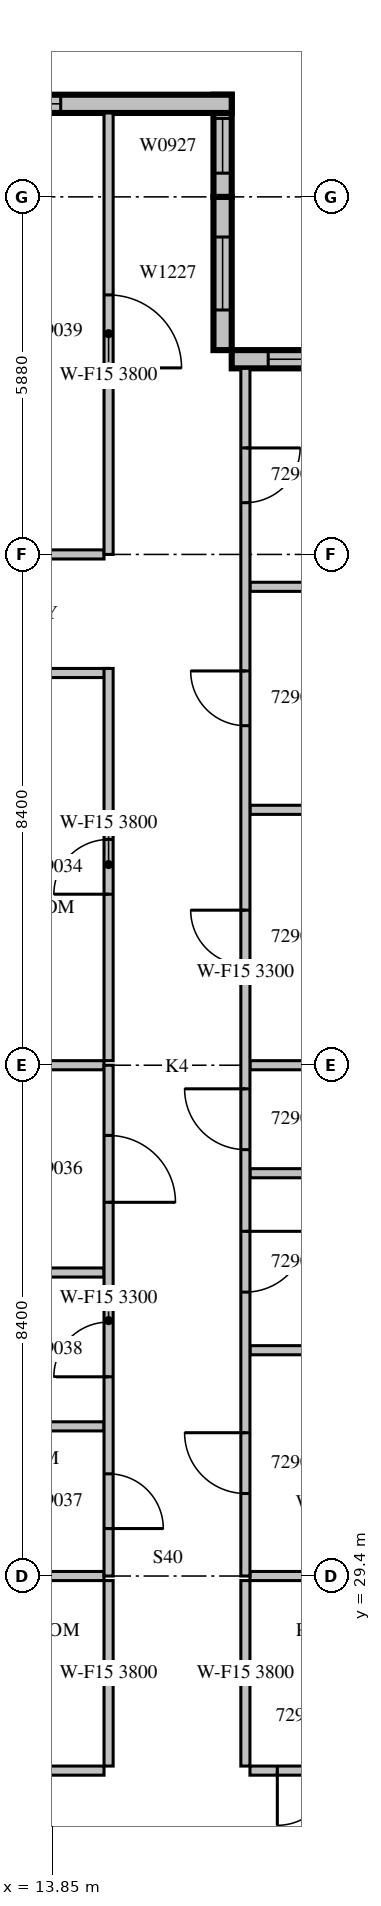
"""IFC4 building model, lengths in metres.
Left out: names, types, materials, properties, quantities, classifications, styles, units other than length and angle.
Written with IfcOpenShell. Run it as: python <this file> out.ifc"""

import sys

from ifc_helpers import new_model, si_unit, direction, frame, frame_2d, origin, place, context, subcontext, project, spatial, rectangle, extrude, source, transform, mapped, element, fill, save


model = new_model("IFC4")
c1 = context("Model", 3, precision=1e-05, world=origin(), true_north=direction((0.0, 1.0)))
c2 = subcontext(c1, "Body", "Model", "MODEL_VIEW")
j1 = project(units=[si_unit("LENGTHUNIT", "METRE"), si_unit("PLANEANGLEUNIT", "RADIAN")], contexts=[c1])
p1 = place(None, origin())
s1 = spatial("IfcSite", under=j1, at=p1, CompositionType="ELEMENT")
p2 = place(p1, origin())
s2 = spatial("IfcBuilding", under=s1, at=p2, CompositionType="ELEMENT")
p3 = place(p2, frame((0.0, 0.0, 132.9)))
s3 = spatial("IfcBuildingStorey", under=s2, at=p3, CompositionType="ELEMENT", Elevation=132.9)
m1 = source(origin(), c2, "Body", "SweptSolid", [
    extrude(rectangle(XDim=4.2, YDim=0.3, at=frame_2d((2.1, 0.0))), origin(), (0.0, 0.0, 1.0), 3.8),
])
p4 = place(p3, frame((21.0, 49.41, 0.0), z_axis=(0.0, 0.0, 1.0), x_axis=(-1.0, 0.0, 0.0)))
e1 = element("IfcWall", 1, at=p4, inside=s3, PredefinedType="STANDARD", context=c2, shape_type="MappedRepresentation", body=[
    mapped(m1, transform((0.0, 0.0, 0.0), scale=1.0)),
])
m2 = source(origin(), c2, "Body", "SweptSolid", [
    extrude(rectangle(XDim=3.0, YDim=2.7, at=frame_2d((1.5, 1.35))), frame((0.0, 0.16, 0.0), z_axis=(0.0, -1.0, 0.0), x_axis=(1.0, 0.0, 0.0)), (0.0, 0.0, 1.0), 0.32),
])
p5 = place(p4, frame((0.6, 0.0, 0.6)))
e2 = element("IfcOpeningElement", 2, at=p5, cuts=e1, PredefinedType="OPENING", context=c2, shape_type="MappedRepresentation", body=[
    mapped(m2, transform((0.0, 0.0, 0.0), scale=1.0)),
])
m3 = source(origin(), c2, "Body", "SweptSolid", [
    extrude(rectangle(XDim=2.52, YDim=0.3, at=frame_2d((1.26, 0.0))), origin(), (0.0, 0.0, 1.0), 3.8),
])
p6 = place(p3, frame((16.65, 49.56, 0.0), z_axis=(0.0, 0.0, 1.0), x_axis=(0.0, 1.0, 0.0)))
e3 = element("IfcWall", 3, at=p6, inside=s3, PredefinedType="STANDARD", context=c2, shape_type="MappedRepresentation", body=[
    mapped(m3, transform((0.0, 0.0, 0.0), scale=1.0)),
])
m4 = source(origin(), c2, "Body", "SweptSolid", [
    extrude(rectangle(XDim=1.2, YDim=2.7, at=frame_2d((0.6, 1.35))), frame((0.0, 0.16, 0.0), z_axis=(0.0, -1.0, 0.0), x_axis=(1.0, 0.0, 0.0)), (0.0, 0.0, 1.0), 0.32),
])
p7 = place(p6, frame((0.66, 0.0, 0.6)))
e4 = element("IfcOpeningElement", 4, at=p7, cuts=e3, PredefinedType="OPENING", context=c2, shape_type="MappedRepresentation", body=[
    mapped(m4, transform((0.0, 0.0, 0.0), scale=1.0)),
])
m5 = source(origin(), c2, "Body", "SweptSolid", [
    extrude(rectangle(XDim=1.68, YDim=0.3, at=frame_2d((0.84, 0.0))), origin(), (0.0, 0.0, 1.0), 3.8),
])
p8 = place(p3, frame((16.65, 52.08, 0.0), z_axis=(0.0, 0.0, 1.0), x_axis=(0.0, 1.0, 0.0)))
e5 = element("IfcWall", 5, at=p8, inside=s3, PredefinedType="STANDARD", context=c2, shape_type="MappedRepresentation", body=[
    mapped(m5, transform((0.0, 0.0, 0.0), scale=1.0)),
])
m6 = source(origin(), c2, "Body", "SweptSolid", [
    extrude(rectangle(XDim=0.9, YDim=2.7, at=frame_2d((0.45, 1.35))), frame((0.0, 0.16, 0.0), z_axis=(0.0, -1.0, 0.0), x_axis=(1.0, 0.0, 0.0)), (0.0, 0.0, 1.0), 0.32),
])
p9 = place(p8, frame((0.39, 0.0, 0.6)))
e6 = element("IfcOpeningElement", 6, at=p9, cuts=e5, PredefinedType="OPENING", context=c2, shape_type="MappedRepresentation", body=[
    mapped(m6, transform((0.0, 0.0, 0.0), scale=1.0)),
])
m7 = source(origin(), c2, "Body", "SweptSolid", [
    extrude(rectangle(XDim=10.5, YDim=0.3, at=frame_2d((5.25, 0.0))), origin(), (0.0, 0.0, 1.0), 3.8),
])
p10 = place(p3, frame((16.8, 53.61, 0.0), z_axis=(0.0, 0.0, 1.0), x_axis=(-1.0, 0.0, 0.0)))
e7 = element("IfcWall", 7, at=p10, inside=s3, PredefinedType="STANDARD", context=c2, shape_type="MappedRepresentation", body=[
    mapped(m7, transform((0.0, 0.0, 0.0), scale=1.0)),
])
m8 = source(origin(), c2, "Body", "SweptSolid", [
    extrude(rectangle(XDim=1.8, YDim=2.7, at=frame_2d((0.9, 1.35))), frame((0.0, 0.16, 0.0), z_axis=(0.0, -1.0, 0.0), x_axis=(1.0, 0.0, 0.0)), (0.0, 0.0, 1.0), 0.32),
])
p11 = place(p10, frame((8.025, 0.0, 0.6)))
e8 = element("IfcOpeningElement", 8, at=p11, cuts=e7, PredefinedType="OPENING", context=c2, shape_type="MappedRepresentation", body=[
    mapped(m8, transform((0.0, 0.0, 0.0), scale=1.0)),
])
m9 = source(origin(), c2, "Body", "SweptSolid", [
    extrude(rectangle(XDim=2.4, YDim=2.7, at=frame_2d((1.2, 1.35))), frame((0.0, 0.16, 0.0), z_axis=(0.0, -1.0, 0.0), x_axis=(1.0, 0.0, 0.0)), (0.0, 0.0, 1.0), 0.32),
])
p12 = place(p10, frame((2.812, 0.0, 0.6)))
e9 = element("IfcOpeningElement", 9, at=p12, cuts=e7, PredefinedType="OPENING", context=c2, shape_type="MappedRepresentation", body=[
    mapped(m9, transform((0.0, 0.0, 0.0), scale=1.0)),
])
m10 = source(origin(), c2, "Body", "SweptSolid", [
    extrude(rectangle(XDim=3.995, YDim=0.15, at=frame_2d((1.998, 0.0))), origin(), (0.0, 0.0, 1.0), 3.8),
])
p13 = place(p3, frame((10.705, 26.2, 0.0), z_axis=(0.0, 0.0, 1.0), x_axis=(1.0, 0.0, 0.0)))
e10 = element("IfcWall", 10, at=p13, inside=s3, PredefinedType="PARTITIONING", context=c2, shape_type="MappedRepresentation", body=[
    mapped(m10, transform((0.0, 0.0, 0.0), scale=1.0)),
])
m11 = source(origin(), c2, "Body", "SweptSolid", [
    extrude(rectangle(XDim=0.9, YDim=2.1, at=frame_2d((0.45, 1.05))), frame((0.0, 0.085, 0.0), z_axis=(0.0, -1.0, 0.0), x_axis=(1.0, 0.0, 0.0)), (0.0, 0.0, 1.0), 0.17),
])
p14 = place(p13, frame((2.132, 0.0, 0.0)))
e11 = element("IfcOpeningElement", 11, at=p14, cuts=e10, PredefinedType="OPENING", context=c2, shape_type="MappedRepresentation", body=[
    mapped(m11, transform((0.0, 0.0, 0.0), scale=1.0)),
])
m12 = source(origin(), c2, "Body", "SweptSolid", [
    extrude(rectangle(XDim=3.6, YDim=0.15, at=frame_2d((1.8, 0.0))), origin(), (0.0, 0.0, 1.0), 3.8),
])
p15 = place(p3, frame((17.1, 26.2, 0.0), z_axis=(0.0, 0.0, 1.0), x_axis=(1.0, 0.0, 0.0)))
e12 = element("IfcWall", 12, at=p15, inside=s3, PredefinedType="PARTITIONING", context=c2, shape_type="MappedRepresentation", body=[
    mapped(m12, transform((0.0, 0.0, 0.0), scale=1.0)),
])
p16 = place(p15, frame((0.45, 0.0, 0.0)))
e13 = element("IfcOpeningElement", 13, at=p16, cuts=e12, PredefinedType="OPENING", context=c2, shape_type="MappedRepresentation", body=[
    mapped(m11, transform((0.0, 0.0, 0.0), scale=1.0)),
])
m13 = source(origin(), c2, "Body", "SweptSolid", [
    extrude(rectangle(XDim=3.05, YDim=0.15, at=frame_2d((1.525, 0.0))), origin(), (0.0, 0.0, 1.0), 3.8),
])
for number, where, z_axis, x_axis in (
    (14, (14.775, 26.275, 0.0), (0.0, 0.0, 1.0), (0.0, 1.0, 0.0)),
    (15, (17.025, 29.325, 0.0), (0.0, 0.0, 1.0), (0.0, -1.0, 0.0)),
):
    element("IfcWall", number, at=place(p3, frame(where, z_axis=z_axis, x_axis=x_axis)), inside=s3, PredefinedType="PARTITIONING", context=c2, shape_type="MappedRepresentation", body=[
        mapped(m13, transform((0.0, 0.0, 0.0), scale=1.0)),
    ])
m14 = source(origin(), c2, "Body", "SweptSolid", [
    extrude(rectangle(XDim=3.676, YDim=0.15, at=frame_2d((1.838, 0.0))), origin(), (0.0, 0.0, 1.0), 3.8),
])
p17 = place(p3, frame((14.7, 29.4, 0.0), z_axis=(0.0, 0.0, 1.0), x_axis=(-1.0, 0.0, 0.0)))
e16 = element("IfcWall", 16, at=p17, inside=s3, PredefinedType="PARTITIONING", context=c2, shape_type="MappedRepresentation", body=[
    mapped(m14, transform((0.0, 0.0, 0.0), scale=1.0)),
])
m15 = source(origin(), c2, "Body", "SweptSolid", [
    extrude(rectangle(XDim=2.851, YDim=0.15, at=frame_2d((1.425, 0.0))), origin(), (0.0, 0.0, 1.0), 3.8),
])
p18 = place(p3, frame((19.951, 29.4, 0.0), z_axis=(0.0, 0.0, 1.0), x_axis=(-1.0, 0.0, 0.0)))
e17 = element("IfcWall", 17, at=p18, inside=s3, PredefinedType="PARTITIONING", context=c2, shape_type="MappedRepresentation", body=[
    mapped(m15, transform((0.0, 0.0, 0.0), scale=1.0)),
])
m16 = source(origin(), c2, "Body", "SweptSolid", [
    extrude(rectangle(XDim=3.675, YDim=0.15, at=frame_2d((1.837, 0.0))), origin(), (0.0, 0.0, 1.0), 3.8),
])
p19 = place(p3, frame((14.775, 44.25, 0.0), z_axis=(0.0, 0.0, 1.0), x_axis=(-1.0, 0.0, 0.0)))
e18 = element("IfcWall", 18, at=p19, inside=s3, PredefinedType="PARTITIONING", context=c2, shape_type="MappedRepresentation", body=[
    mapped(m16, transform((0.0, 0.0, 0.0), scale=1.0)),
])
m17 = source(origin(), c2, "Body", "SweptSolid", [
    extrude(rectangle(XDim=6.45, YDim=0.15, at=frame_2d((3.225, 0.0))), origin(), (0.0, 0.0, 1.0), 3.8),
])
p20 = place(p3, frame((14.775, 37.875, 0.0), z_axis=(0.0, 0.0, 1.0), x_axis=(0.0, 1.0, 0.0)))
e19 = element("IfcWall", 19, at=p20, inside=s3, PredefinedType="PARTITIONING", context=c2, shape_type="MappedRepresentation", body=[
    mapped(m17, transform((0.0, 0.0, 0.0), scale=1.0)),
])
p21 = place(p20, frame((2.737, 0.0, 0.0)))
e20 = element("IfcOpeningElement", 20, at=p21, cuts=e19, PredefinedType="OPENING", context=c2, shape_type="MappedRepresentation", body=[
    mapped(m11, transform((0.0, 0.0, 0.0), scale=1.0)),
])
p22 = place(p3, frame((14.7, 31.861, 0.0), z_axis=(0.0, 0.0, 1.0), x_axis=(-1.0, 0.0, 0.0)))
e21 = element("IfcWall", 21, at=p22, inside=s3, PredefinedType="PARTITIONING", context=c2, shape_type="MappedRepresentation", body=[
    mapped(m10, transform((0.0, 0.0, 0.0), scale=1.0)),
])
p23 = place(p3, frame((14.7, 34.391, 0.0), z_axis=(0.0, 0.0, 1.0), x_axis=(-1.0, 0.0, 0.0)))
e22 = element("IfcWall", 22, at=p23, inside=s3, PredefinedType="PARTITIONING", context=c2, shape_type="SweptSolid", body=[
    extrude(rectangle(XDim=3.995, YDim=0.15, at=frame_2d((1.998, 0.0))), origin(), (0.0, 0.0, 1.0), 3.3),
])
p24 = place(p3, frame((14.7, 37.8, 0.0), z_axis=(0.0, 0.0, 1.0), x_axis=(-1.0, 0.0, 0.0)))
e23 = element("IfcWall", 23, at=p24, inside=s3, PredefinedType="PARTITIONING", context=c2, shape_type="MappedRepresentation", body=[
    mapped(m14, transform((0.0, 0.0, 0.0), scale=1.0)),
])
m18 = source(origin(), c2, "Body", "SweptSolid", [
    extrude(rectangle(XDim=3.525, YDim=0.15, at=frame_2d((1.762, 0.0))), origin(), (0.0, 0.0, 1.0), 3.8),
])
p25 = place(p3, frame((14.7, 46.2, 0.0), z_axis=(0.0, 0.0, 1.0), x_axis=(-1.0, 0.0, 0.0)))
e24 = element("IfcWall", 24, at=p25, inside=s3, PredefinedType="PARTITIONING", context=c2, shape_type="MappedRepresentation", body=[
    mapped(m18, transform((0.0, 0.0, 0.0), scale=1.0)),
])
m19 = source(origin(), c2, "Body", "SweptSolid", [
    extrude(rectangle(XDim=3.6, YDim=0.15, at=frame_2d((1.8, 0.0))), origin(), (0.0, 0.0, 1.0), 2.8),
])
for number, where, z_axis, x_axis in (
    (25, (17.1, 33.113, 0.0), (0.0, 0.0, 1.0), (1.0, 0.0, 0.0)),
    (26, (17.1, 36.024, 0.0), (0.0, 0.0, 1.0), (1.0, 0.0, 0.0)),
):
    element("IfcWall", number, at=place(p3, frame(where, z_axis=z_axis, x_axis=x_axis)), inside=s3, PredefinedType="PARTITIONING", context=c2, shape_type="MappedRepresentation", body=[
        mapped(m19, transform((0.0, 0.0, 0.0), scale=1.0)),
    ])
p26 = place(p3, frame((17.1, 45.667, 0.0), z_axis=(0.0, 0.0, 1.0), x_axis=(1.0, 0.0, 0.0)))
e27 = element("IfcWall", 27, at=p26, inside=s3, PredefinedType="PARTITIONING", context=c2, shape_type="MappedRepresentation", body=[
    mapped(m12, transform((0.0, 0.0, 0.0), scale=1.0)),
])
p27 = place(p3, frame((19.951, 37.8, 0.0), z_axis=(0.0, 0.0, 1.0), x_axis=(-1.0, 0.0, 0.0)))
e28 = element("IfcWall", 28, at=p27, inside=s3, PredefinedType="PARTITIONING", context=c2, shape_type="MappedRepresentation", body=[
    mapped(m15, transform((0.0, 0.0, 0.0), scale=1.0)),
])
p28 = place(p3, frame((20.7, 42.0, 0.0), z_axis=(0.0, 0.0, 1.0), x_axis=(-1.0, 0.0, 0.0)))
e29 = element("IfcWall", 29, at=p28, inside=s3, PredefinedType="PARTITIONING", context=c2, shape_type="MappedRepresentation", body=[
    mapped(m12, transform((0.0, 0.0, 0.0), scale=1.0)),
])
m20 = source(origin(), c2, "Body", "SweptSolid", [
    extrude(rectangle(XDim=8.4, YDim=0.15, at=frame_2d((4.2, 0.0))), origin(), (0.0, 0.0, 1.0), 3.3),
])
p29 = place(p3, frame((14.775, 29.4, 0.0), z_axis=(0.0, 0.0, 1.0), x_axis=(0.0, 1.0, 0.0)))
e30 = element("IfcWall", 30, at=p29, inside=s3, PredefinedType="PARTITIONING", context=c2, shape_type="MappedRepresentation", body=[
    mapped(m20, transform((0.0, 0.0, 0.0), scale=1.0)),
])
m21 = source(origin(), c2, "Body", "SweptSolid", [
    extrude(rectangle(XDim=1.1, YDim=2.1, at=frame_2d((0.55, 1.05))), frame((0.0, 0.085, 0.0), z_axis=(0.0, -1.0, 0.0), x_axis=(1.0, 0.0, 0.0)), (0.0, 0.0, 1.0), 0.17),
])
p30 = place(p29, frame((6.146, 0.0, 0.0)))
e31 = element("IfcOpeningElement", 31, at=p30, cuts=e30, PredefinedType="OPENING", context=c2, shape_type="MappedRepresentation", body=[
    mapped(m21, transform((0.0, 0.0, 0.0), scale=1.0)),
])
p31 = place(p29, frame((0.781, 0.0, 0.0)))
e32 = element("IfcOpeningElement", 32, at=p31, cuts=e30, PredefinedType="OPENING", context=c2, shape_type="MappedRepresentation", body=[
    mapped(m11, transform((0.0, 0.0, 0.0), scale=1.0)),
])
p32 = place(p29, frame((3.276, 0.0, 0.0)))
e33 = element("IfcOpeningElement", 33, at=p32, cuts=e30, PredefinedType="OPENING", context=c2, shape_type="MappedRepresentation", body=[
    mapped(m11, transform((0.0, 0.0, 0.0), scale=1.0)),
])
m22 = source(origin(), c2, "Body", "SweptSolid", [
    extrude(rectangle(XDim=7.26, YDim=0.15, at=frame_2d((3.63, 0.0))), origin(), (0.0, 0.0, 1.0), 3.8),
])
p33 = place(p3, frame((14.775, 46.2, 0.0), z_axis=(0.0, 0.0, 1.0), x_axis=(0.0, 1.0, 0.0)))
e34 = element("IfcWall", 34, at=p33, inside=s3, PredefinedType="PARTITIONING", context=c2, shape_type="MappedRepresentation", body=[
    mapped(m22, transform((0.0, 0.0, 0.0), scale=1.0)),
])
m23 = source(origin(), c2, "Body", "SweptSolid", [
    extrude(rectangle(XDim=1.2, YDim=2.1, at=frame_2d((0.6, 1.05))), frame((0.0, 0.085, 0.0), z_axis=(0.0, -1.0, 0.0), x_axis=(1.0, 0.0, 0.0)), (0.0, 0.0, 1.0), 0.17),
])
p34 = place(p33, frame((3.067, 0.0, 0.0)))
e35 = element("IfcOpeningElement", 35, at=p34, cuts=e34, PredefinedType="OPENING", context=c2, shape_type="MappedRepresentation", body=[
    mapped(m23, transform((0.0, 0.0, 0.0), scale=1.0)),
])
m24 = source(origin(), c2, "Body", "SweptSolid", [
    extrude(rectangle(XDim=19.86, YDim=0.15, at=frame_2d((9.93, 0.0))), origin(), (0.0, 0.0, 1.0), 3.3),
])
p35 = place(p3, frame((17.025, 49.26, 0.0), z_axis=(0.0, 0.0, 1.0), x_axis=(0.0, -1.0, 0.0)))
e36 = element("IfcWall", 36, at=p35, inside=s3, PredefinedType="PARTITIONING", context=c2, shape_type="MappedRepresentation", body=[
    mapped(m24, transform((0.0, 0.0, 0.0), scale=1.0)),
])
m25 = source(origin(), c2, "Body", "SweptSolid", [
    extrude(rectangle(XDim=1.0, YDim=2.1, at=frame_2d((0.5, 1.05))), frame((0.0, 0.085, 0.0), z_axis=(0.0, -1.0, 0.0), x_axis=(1.0, 0.0, 0.0)), (0.0, 0.0, 1.0), 0.17),
])
p36 = place(p35, frame((17.503, 0.0, 0.0)))
e37 = element("IfcOpeningElement", 37, at=p36, cuts=e36, PredefinedType="OPENING", context=c2, shape_type="MappedRepresentation", body=[
    mapped(m25, transform((0.0, 0.0, 0.0), scale=1.0)),
])
p37 = place(p35, frame((14.191, 0.0, 0.0)))
e38 = element("IfcOpeningElement", 38, at=p37, cuts=e36, PredefinedType="OPENING", context=c2, shape_type="MappedRepresentation", body=[
    mapped(m25, transform((0.0, 0.0, 0.0), scale=1.0)),
])
p38 = place(p35, frame((11.848, 0.0, 0.0)))
e39 = element("IfcOpeningElement", 39, at=p38, cuts=e36, PredefinedType="OPENING", context=c2, shape_type="MappedRepresentation", body=[
    mapped(m25, transform((0.0, 0.0, 0.0), scale=1.0)),
])
p39 = place(p35, frame((8.91, 0.0, 0.0)))
e40 = element("IfcOpeningElement", 40, at=p39, cuts=e36, PredefinedType="OPENING", context=c2, shape_type="MappedRepresentation", body=[
    mapped(m11, transform((0.0, 0.0, 0.0), scale=1.0)),
])
p40 = place(p35, frame((4.976, 0.0, 0.0)))
e41 = element("IfcOpeningElement", 41, at=p40, cuts=e36, PredefinedType="OPENING", context=c2, shape_type="MappedRepresentation", body=[
    mapped(m11, transform((0.0, 0.0, 0.0), scale=1.0)),
])
p41 = place(p35, frame((1.309, 0.0, 0.0)))
e42 = element("IfcOpeningElement", 42, at=p41, cuts=e36, PredefinedType="OPENING", context=c2, shape_type="MappedRepresentation", body=[
    mapped(m11, transform((0.0, 0.0, 0.0), scale=1.0)),
])
m26 = source(origin(), c2, "Body", "SweptSolid", [
    extrude(rectangle(XDim=3.0, YDim=2.7, at=frame_2d((1.5, 1.35))), frame((0.0, 0.03, 0.0), z_axis=(0.0, -1.0, 0.0), x_axis=(1.0, 0.0, 0.0)), (0.0, 0.0, 1.0), 0.06),
])
p42 = place(p5, origin())
e43 = element("IfcWindow", 43, at=p42, inside=s3, PartitioningType="SINGLE_PANEL", PredefinedType="WINDOW", context=c2, shape_type="MappedRepresentation", body=[
    mapped(m26, transform((0.0, 0.0, 0.0), scale=1.0)),
])
fill(e2, e43)
m27 = source(origin(), c2, "Body", "SweptSolid", [
    extrude(rectangle(XDim=1.2, YDim=2.7, at=frame_2d((0.6, 1.35))), frame((0.0, 0.03, 0.0), z_axis=(0.0, -1.0, 0.0), x_axis=(1.0, 0.0, 0.0)), (0.0, 0.0, 1.0), 0.06),
])
p43 = place(p7, origin())
e44 = element("IfcWindow", 44, at=p43, inside=s3, PartitioningType="SINGLE_PANEL", PredefinedType="WINDOW", context=c2, shape_type="MappedRepresentation", body=[
    mapped(m27, transform((0.0, 0.0, 0.0), scale=1.0)),
])
fill(e4, e44)
m28 = source(origin(), c2, "Body", "SweptSolid", [
    extrude(rectangle(XDim=0.9, YDim=2.7, at=frame_2d((0.45, 1.35))), frame((0.0, 0.03, 0.0), z_axis=(0.0, -1.0, 0.0), x_axis=(1.0, 0.0, 0.0)), (0.0, 0.0, 1.0), 0.06),
])
p44 = place(p9, origin())
e45 = element("IfcWindow", 45, at=p44, inside=s3, PartitioningType="SINGLE_PANEL", PredefinedType="WINDOW", context=c2, shape_type="MappedRepresentation", body=[
    mapped(m28, transform((0.0, 0.0, 0.0), scale=1.0)),
])
fill(e6, e45)
m29 = source(origin(), c2, "Body", "SweptSolid", [
    extrude(rectangle(XDim=2.4, YDim=2.7, at=frame_2d((1.2, 1.35))), frame((0.0, 0.03, 0.0), z_axis=(0.0, -1.0, 0.0), x_axis=(1.0, 0.0, 0.0)), (0.0, 0.0, 1.0), 0.06),
])
p45 = place(p12, origin())
e46 = element("IfcWindow", 46, at=p45, inside=s3, PartitioningType="SINGLE_PANEL", PredefinedType="WINDOW", context=c2, shape_type="MappedRepresentation", body=[
    mapped(m29, transform((0.0, 0.0, 0.0), scale=1.0)),
])
fill(e9, e46)
m30 = source(origin(), c2, "Body", "SweptSolid", [
    extrude(rectangle(XDim=0.9, YDim=2.1, at=frame_2d((0.45, 1.05))), frame((0.0, 0.025, 0.0), z_axis=(0.0, -1.0, 0.0), x_axis=(1.0, 0.0, 0.0)), (0.0, 0.0, 1.0), 0.05),
])
p46 = place(p16, origin())
e47 = element("IfcDoor", 47, at=p46, inside=s3, OperationType="SINGLE_SWING_RIGHT", PredefinedType="DOOR", context=c2, shape_type="MappedRepresentation", body=[
    mapped(m30, transform((0.0, 0.0, 0.0), scale=1.0)),
])
fill(e13, e47)
p47 = place(p21, origin())
e48 = element("IfcDoor", 48, at=p47, inside=s3, OperationType="SINGLE_SWING_LEFT", PredefinedType="DOOR", context=c2, shape_type="MappedRepresentation", body=[
    mapped(m30, transform((0.0, 0.0, 0.0), scale=1.0)),
])
fill(e20, e48)
m31 = source(origin(), c2, "Body", "SweptSolid", [
    extrude(rectangle(XDim=1.1, YDim=2.1, at=frame_2d((0.55, 1.05))), frame((0.0, 0.025, 0.0), z_axis=(0.0, -1.0, 0.0), x_axis=(1.0, 0.0, 0.0)), (0.0, 0.0, 1.0), 0.05),
])
p48 = place(p30, origin())
e49 = element("IfcDoor", 49, at=p48, inside=s3, OperationType="SINGLE_SWING_RIGHT", PredefinedType="DOOR", context=c2, shape_type="MappedRepresentation", body=[
    mapped(m31, transform((0.0, 0.0, 0.0), scale=1.0)),
])
fill(e31, e49)
p49 = place(p31, origin())
e50 = element("IfcDoor", 50, at=p49, inside=s3, OperationType="SINGLE_SWING_RIGHT", PredefinedType="DOOR", context=c2, shape_type="MappedRepresentation", body=[
    mapped(m30, transform((0.0, 0.0, 0.0), scale=1.0)),
])
fill(e32, e50)
p50 = place(p32, origin())
e51 = element("IfcDoor", 51, at=p50, inside=s3, OperationType="SINGLE_SWING_LEFT", PredefinedType="DOOR", context=c2, shape_type="MappedRepresentation", body=[
    mapped(m30, transform((0.0, 0.0, 0.0), scale=1.0)),
])
fill(e33, e51)
m32 = source(origin(), c2, "Body", "SweptSolid", [
    extrude(rectangle(XDim=1.2, YDim=2.1, at=frame_2d((0.6, 1.05))), frame((0.0, 0.025, 0.0), z_axis=(0.0, -1.0, 0.0), x_axis=(1.0, 0.0, 0.0)), (0.0, 0.0, 1.0), 0.05),
])
p51 = place(p34, origin())
e52 = element("IfcDoor", 52, at=p51, inside=s3, OperationType="SINGLE_SWING_RIGHT", PredefinedType="DOOR", context=c2, shape_type="MappedRepresentation", body=[
    mapped(m32, transform((0.0, 0.0, 0.0), scale=1.0)),
])
fill(e35, e52)
m33 = source(origin(), c2, "Body", "SweptSolid", [
    extrude(rectangle(XDim=1.0, YDim=2.1, at=frame_2d((0.5, 1.05))), frame((0.0, 0.025, 0.0), z_axis=(0.0, -1.0, 0.0), x_axis=(1.0, 0.0, 0.0)), (0.0, 0.0, 1.0), 0.05),
])
p52 = place(p36, origin())
e53 = element("IfcDoor", 53, at=p52, inside=s3, OperationType="SINGLE_SWING_RIGHT", PredefinedType="DOOR", context=c2, shape_type="MappedRepresentation", body=[
    mapped(m33, transform((0.0, 0.0, 0.0), scale=1.0)),
])
fill(e37, e53)
p53 = place(p37, origin())
e54 = element("IfcDoor", 54, at=p53, inside=s3, OperationType="SINGLE_SWING_LEFT", PredefinedType="DOOR", context=c2, shape_type="MappedRepresentation", body=[
    mapped(m33, transform((0.0, 0.0, 0.0), scale=1.0)),
])
fill(e38, e54)
p54 = place(p38, origin())
e55 = element("IfcDoor", 55, at=p54, inside=s3, OperationType="SINGLE_SWING_RIGHT", PredefinedType="DOOR", context=c2, shape_type="MappedRepresentation", body=[
    mapped(m33, transform((0.0, 0.0, 0.0), scale=1.0)),
])
fill(e39, e55)
p55 = place(p39, origin())
e56 = element("IfcDoor", 56, at=p55, inside=s3, OperationType="SINGLE_SWING_RIGHT", PredefinedType="DOOR", context=c2, shape_type="MappedRepresentation", body=[
    mapped(m30, transform((0.0, 0.0, 0.0), scale=1.0)),
])
fill(e40, e56)
p56 = place(p40, origin())
e57 = element("IfcDoor", 57, at=p56, inside=s3, OperationType="SINGLE_SWING_RIGHT", PredefinedType="DOOR", context=c2, shape_type="MappedRepresentation", body=[
    mapped(m30, transform((0.0, 0.0, 0.0), scale=1.0)),
])
fill(e41, e57)
p57 = place(p41, origin())
e58 = element("IfcDoor", 58, at=p57, inside=s3, OperationType="SINGLE_SWING_LEFT", PredefinedType="DOOR", context=c2, shape_type="MappedRepresentation", body=[
    mapped(m30, transform((0.0, 0.0, 0.0), scale=1.0)),
])
fill(e42, e58)
save(model, sys.argv[1])
